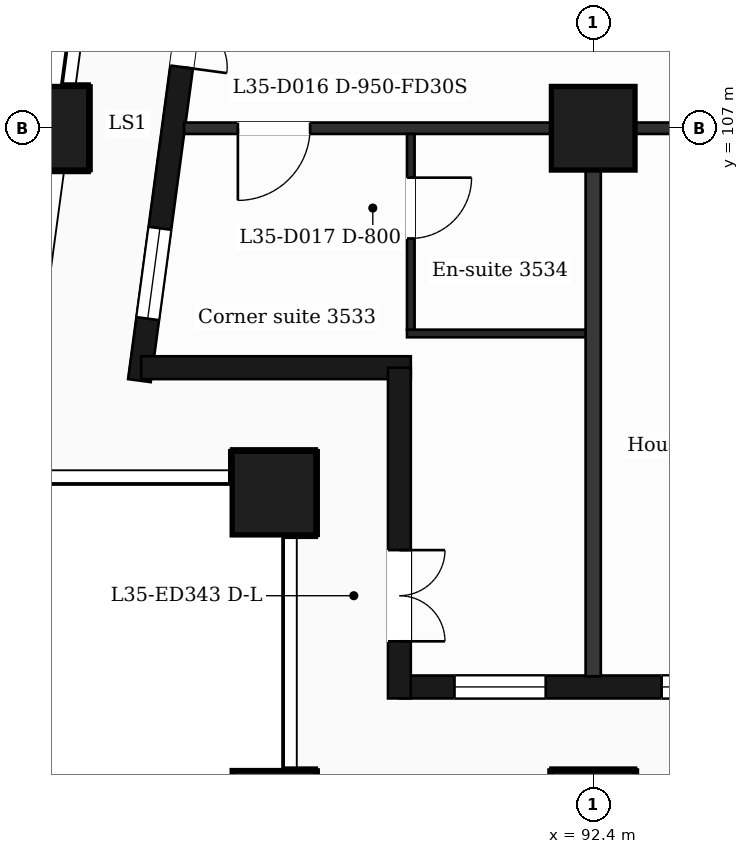
"""IFC4 building model, lengths in metres.
Left out: names, types, materials, properties, quantities, classifications, styles, units other than length and angle.
Written with IfcOpenShell. Run it as: python <this file> out.ifc"""

import sys

from ifc_helpers import new_model, si_unit, direction, frame, frame_2d, origin, origin_2d, place, context, subcontext, project, spatial, rectangle, extrude, element, fill, save


model = new_model("IFC4")
c1 = context("Model", 3, precision=1e-05, world=origin(), true_north=direction((0.0, 1.0)))
c2 = subcontext(c1, "Body", "Model", "MODEL_VIEW")
j1 = project(units=[si_unit("LENGTHUNIT", "METRE"), si_unit("PLANEANGLEUNIT", "RADIAN")], contexts=[c1])
p1 = place(None, origin())
s1 = spatial("IfcSite", under=j1, at=p1, CompositionType="ELEMENT")
p2 = place(p1, origin())
s2 = spatial("IfcBuilding", under=s1, at=p2, CompositionType="ELEMENT")
p3 = place(p2, frame((0.0, 0.0, 151.5)))
s3 = spatial("IfcBuildingStorey", under=s2, at=p3, CompositionType="ELEMENT", Elevation=151.5)
for number, where, z_axis, x_axis in (
    (1, (92.4, 98.0, 0.0), (0.0, 0.0, 1.0), (1.0, 0.0, 0.0)),
    (2, (88.2, 98.0, 0.0), (0.0, 0.0, 1.0), (1.0, 0.0, 0.0)),
    (3, (88.2, 102.2, 0.0), (0.0, 0.0, 1.0), (1.0, 0.0, 0.0)),
    (4, (92.4, 107.0, 0.0), (0.0, 0.0, 1.0), (1.0, 0.0, 0.0)),
    (5, (85.211, 107.0, 0.0), (0.0, 0.0, 1.0), (1.0, 0.0, 0.0)),
):
    element("IfcColumn", number, at=place(p3, frame(where, z_axis=z_axis, x_axis=x_axis)), inside=s3, PredefinedType="COLUMN", context=c2, shape_type="SweptSolid", body=[
        extrude(rectangle(XDim=1.1, YDim=1.1, at=origin_2d()), origin(), (0.0, 0.0, 1.0), 3.7),
    ])
p4 = place(p3, frame((89.85, 99.65, 0.0), z_axis=(0.0, 0.0, 1.0), x_axis=(1.0, 0.0, 0.0)))
e6 = element("IfcWall", 6, at=p4, inside=s3, PredefinedType="SOLIDWALL", context=c2, shape_type="SweptSolid", body=[
    extrude(rectangle(XDim=47.25, YDim=0.3, at=frame_2d((23.625, 0.0))), origin(), (0.0, 0.0, 1.0), 3.38),
])
p5 = place(p4, frame((0.725, 0.0, 0.9)))
e7 = element("IfcOpeningElement", 7, at=p5, cuts=e6, PredefinedType="OPENING", context=c2, shape_type="SweptSolid", body=[
    extrude(rectangle(XDim=1.2, YDim=2.1, at=frame_2d((0.6, 1.05))), frame((0.0, 0.16, 0.0), z_axis=(0.0, -1.0, 0.0), x_axis=(1.0, 0.0, 0.0)), (0.0, 0.0, 1.0), 0.32),
])
p6 = place(p4, frame((3.45, 0.0, 0.9)))
e8 = element("IfcOpeningElement", 8, at=p6, cuts=e6, PredefinedType="OPENING", context=c2, shape_type="SweptSolid", body=[
    extrude(rectangle(XDim=2.4, YDim=2.1, at=frame_2d((1.2, 1.05))), frame((0.0, 0.16, 0.0), z_axis=(0.0, -1.0, 0.0), x_axis=(1.0, 0.0, 0.0)), (0.0, 0.0, 1.0), 0.32),
])
p7 = place(p4, frame((7.35, 0.0, 0.0)))
e9 = element("IfcOpeningElement", 9, at=p7, cuts=e6, PredefinedType="OPENING", context=c2, shape_type="SweptSolid", body=[
    extrude(rectangle(XDim=1.2, YDim=2.4, at=frame_2d((0.6, 1.2))), frame((0.0, 0.16, 0.0), z_axis=(0.0, -1.0, 0.0), x_axis=(1.0, 0.0, 0.0)), (0.0, 0.0, 1.0), 0.32),
])
p8 = place(p4, frame((9.15, 0.0, 0.9)))
e10 = element("IfcOpeningElement", 10, at=p8, cuts=e6, PredefinedType="OPENING", context=c2, shape_type="SweptSolid", body=[
    extrude(rectangle(XDim=1.2, YDim=2.1, at=frame_2d((0.6, 1.05))), frame((0.0, 0.16, 0.0), z_axis=(0.0, -1.0, 0.0), x_axis=(1.0, 0.0, 0.0)), (0.0, 0.0, 1.0), 0.32),
])
p9 = place(p4, frame((11.85, 0.0, 0.9)))
e11 = element("IfcOpeningElement", 11, at=p9, cuts=e6, PredefinedType="OPENING", context=c2, shape_type="SweptSolid", body=[
    extrude(rectangle(XDim=2.4, YDim=2.1, at=frame_2d((1.2, 1.05))), frame((0.0, 0.16, 0.0), z_axis=(0.0, -1.0, 0.0), x_axis=(1.0, 0.0, 0.0)), (0.0, 0.0, 1.0), 0.32),
])
p10 = place(p4, frame((16.05, 0.0, 0.9)))
e12 = element("IfcOpeningElement", 12, at=p10, cuts=e6, PredefinedType="OPENING", context=c2, shape_type="SweptSolid", body=[
    extrude(rectangle(XDim=2.4, YDim=2.1, at=frame_2d((1.2, 1.05))), frame((0.0, 0.16, 0.0), z_axis=(0.0, -1.0, 0.0), x_axis=(1.0, 0.0, 0.0)), (0.0, 0.0, 1.0), 0.32),
])
p11 = place(p4, frame((20.85, 0.0, 0.9)))
e13 = element("IfcOpeningElement", 13, at=p11, cuts=e6, PredefinedType="OPENING", context=c2, shape_type="SweptSolid", body=[
    extrude(rectangle(XDim=1.2, YDim=2.1, at=frame_2d((0.6, 1.05))), frame((0.0, 0.16, 0.0), z_axis=(0.0, -1.0, 0.0), x_axis=(1.0, 0.0, 0.0)), (0.0, 0.0, 1.0), 0.32),
])
p12 = place(p4, frame((25.05, 0.0, 0.9)))
e14 = element("IfcOpeningElement", 14, at=p12, cuts=e6, PredefinedType="OPENING", context=c2, shape_type="SweptSolid", body=[
    extrude(rectangle(XDim=1.2, YDim=2.1, at=frame_2d((0.6, 1.05))), frame((0.0, 0.16, 0.0), z_axis=(0.0, -1.0, 0.0), x_axis=(1.0, 0.0, 0.0)), (0.0, 0.0, 1.0), 0.32),
])
p13 = place(p4, frame((28.65, 0.0, 0.9)))
e15 = element("IfcOpeningElement", 15, at=p13, cuts=e6, PredefinedType="OPENING", context=c2, shape_type="SweptSolid", body=[
    extrude(rectangle(XDim=2.4, YDim=2.1, at=frame_2d((1.2, 1.05))), frame((0.0, 0.16, 0.0), z_axis=(0.0, -1.0, 0.0), x_axis=(1.0, 0.0, 0.0)), (0.0, 0.0, 1.0), 0.32),
])
p14 = place(p4, frame((32.85, 0.0, 0.9)))
e16 = element("IfcOpeningElement", 16, at=p14, cuts=e6, PredefinedType="OPENING", context=c2, shape_type="SweptSolid", body=[
    extrude(rectangle(XDim=2.4, YDim=2.1, at=frame_2d((1.2, 1.05))), frame((0.0, 0.16, 0.0), z_axis=(0.0, -1.0, 0.0), x_axis=(1.0, 0.0, 0.0)), (0.0, 0.0, 1.0), 0.32),
])
p15 = place(p4, frame((37.05, 0.0, 0.9)))
e17 = element("IfcOpeningElement", 17, at=p15, cuts=e6, PredefinedType="OPENING", context=c2, shape_type="SweptSolid", body=[
    extrude(rectangle(XDim=2.4, YDim=2.1, at=frame_2d((1.2, 1.05))), frame((0.0, 0.16, 0.0), z_axis=(0.0, -1.0, 0.0), x_axis=(1.0, 0.0, 0.0)), (0.0, 0.0, 1.0), 0.32),
])
p16 = place(p4, frame((41.25, 0.0, 0.9)))
e18 = element("IfcOpeningElement", 18, at=p16, cuts=e6, PredefinedType="OPENING", context=c2, shape_type="SweptSolid", body=[
    extrude(rectangle(XDim=2.4, YDim=2.1, at=frame_2d((1.2, 1.05))), frame((0.0, 0.16, 0.0), z_axis=(0.0, -1.0, 0.0), x_axis=(1.0, 0.0, 0.0)), (0.0, 0.0, 1.0), 0.32),
])
p17 = place(p4, frame((45.25, 0.0, 0.9)))
e19 = element("IfcOpeningElement", 19, at=p17, cuts=e6, PredefinedType="OPENING", context=c2, shape_type="SweptSolid", body=[
    extrude(rectangle(XDim=1.2, YDim=2.1, at=frame_2d((0.6, 1.05))), frame((0.0, 0.16, 0.0), z_axis=(0.0, -1.0, 0.0), x_axis=(1.0, 0.0, 0.0)), (0.0, 0.0, 1.0), 0.32),
])
p18 = place(p3, frame((87.334, 110.4, 0.0), z_axis=(0.0, 0.0, 1.0), x_axis=(-0.133437175554, -0.991057273915, 0.0)))
e20 = element("IfcWall", 20, at=p18, inside=s3, PredefinedType="SOLIDWALL", context=c2, shape_type="SweptSolid", body=[
    extrude(rectangle(XDim=6.781, YDim=0.3, at=frame_2d((3.39, 0.0))), origin(), (0.0, 0.0, 1.0), 3.38),
])
p19 = place(p18, frame((1.418, 0.0, 0.0)))
e21 = element("IfcOpeningElement", 21, at=p19, cuts=e20, PredefinedType="OPENING", context=c2, shape_type="SweptSolid", body=[
    extrude(rectangle(XDim=1.2, YDim=2.4, at=frame_2d((0.6, 1.2))), frame((0.0, 0.16, 0.0), z_axis=(0.0, -1.0, 0.0), x_axis=(1.0, 0.0, 0.0)), (0.0, 0.0, 1.0), 0.32),
])
p20 = place(p18, frame((4.758, 0.0, 0.9)))
e22 = element("IfcOpeningElement", 22, at=p20, cuts=e20, PredefinedType="OPENING", context=c2, shape_type="SweptSolid", body=[
    extrude(rectangle(XDim=1.2, YDim=2.1, at=frame_2d((0.6, 1.05))), frame((0.0, 0.16, 0.0), z_axis=(0.0, -1.0, 0.0), x_axis=(1.0, 0.0, 0.0)), (0.0, 0.0, 1.0), 0.32),
])
p21 = place(p3, frame((86.452, 103.85, 0.0), z_axis=(0.0, 0.0, 1.0), x_axis=(1.0, 0.0, 0.0)))
e23 = element("IfcWall", 23, at=p21, inside=s3, PredefinedType="SOLIDWALL", context=c2, shape_type="SweptSolid", body=[
    extrude(rectangle(XDim=3.548, YDim=0.3, at=frame_2d((1.774, 0.0))), origin(), (0.0, 0.0, 1.0), 3.38),
])
p22 = place(p3, frame((89.85, 103.85, 0.0), z_axis=(0.0, 0.0, 1.0), x_axis=(0.0, -1.0, 0.0)))
e24 = element("IfcWall", 24, at=p22, inside=s3, PredefinedType="SOLIDWALL", context=c2, shape_type="SweptSolid", body=[
    extrude(rectangle(XDim=4.35, YDim=0.3, at=frame_2d((2.175, 0.0))), origin(), (0.0, 0.0, 1.0), 3.38),
])
p23 = place(p22, frame((2.4, 0.0, 0.0)))
e25 = element("IfcOpeningElement", 25, at=p23, cuts=e24, PredefinedType="OPENING", context=c2, shape_type="SweptSolid", body=[
    extrude(rectangle(XDim=1.2, YDim=2.4, at=frame_2d((0.6, 1.2))), frame((0.0, 0.16, 0.0), z_axis=(0.0, -1.0, 0.0), x_axis=(1.0, 0.0, 0.0)), (0.0, 0.0, 1.0), 0.32),
])
p24 = place(p3, frame((89.95, 104.3, 0.0), z_axis=(0.0, 0.0, 1.0), x_axis=(1.0, 0.0, 0.0)))
e26 = element("IfcWall", 26, at=p24, inside=s3, PredefinedType="PARTITIONING", context=c2, shape_type="SweptSolid", body=[
    extrude(rectangle(XDim=2.45, YDim=0.1, at=frame_2d((1.225, 0.0))), origin(), (0.0, 0.0, 1.0), 3.38),
])
p25 = place(p3, frame((87.018, 107.0, 0.0), z_axis=(0.0, 0.0, 1.0), x_axis=(1.0, 0.0, 0.0)))
e27 = element("IfcWall", 27, at=p25, inside=s3, PredefinedType="PARTITIONING", context=c2, shape_type="SweptSolid", body=[
    extrude(rectangle(XDim=52.765, YDim=0.15, at=frame_2d((26.382, 0.0))), origin(), (0.0, 0.0, 1.0), 3.38),
])
p26 = place(p25, frame((0.707, 0.0, 0.0)))
e28 = element("IfcOpeningElement", 28, at=p26, cuts=e27, PredefinedType="OPENING", context=c2, shape_type="SweptSolid", body=[
    extrude(rectangle(XDim=0.95, YDim=2.1, at=frame_2d((0.475, 1.05))), frame((0.0, 0.085, 0.0), z_axis=(0.0, -1.0, 0.0), x_axis=(1.0, 0.0, 0.0)), (0.0, 0.0, 1.0), 0.17),
])
p27 = place(p25, frame((7.645, 0.0, 0.0)))
e29 = element("IfcOpeningElement", 29, at=p27, cuts=e27, PredefinedType="OPENING", context=c2, shape_type="SweptSolid", body=[
    extrude(rectangle(XDim=0.95, YDim=2.1, at=frame_2d((0.475, 1.05))), frame((0.0, 0.085, 0.0), z_axis=(0.0, -1.0, 0.0), x_axis=(1.0, 0.0, 0.0)), (0.0, 0.0, 1.0), 0.17),
])
p28 = place(p25, frame((12.067, 0.0, 0.0)))
e30 = element("IfcOpeningElement", 30, at=p28, cuts=e27, PredefinedType="OPENING", context=c2, shape_type="SweptSolid", body=[
    extrude(rectangle(XDim=0.95, YDim=2.1, at=frame_2d((0.475, 1.05))), frame((0.0, 0.085, 0.0), z_axis=(0.0, -1.0, 0.0), x_axis=(1.0, 0.0, 0.0)), (0.0, 0.0, 1.0), 0.17),
])
p29 = place(p25, frame((14.582, 0.0, 0.0)))
e31 = element("IfcOpeningElement", 31, at=p29, cuts=e27, PredefinedType="OPENING", context=c2, shape_type="SweptSolid", body=[
    extrude(rectangle(XDim=0.95, YDim=2.1, at=frame_2d((0.475, 1.05))), frame((0.0, 0.085, 0.0), z_axis=(0.0, -1.0, 0.0), x_axis=(1.0, 0.0, 0.0)), (0.0, 0.0, 1.0), 0.17),
])
p30 = place(p25, frame((20.432, 0.0, 0.0)))
e32 = element("IfcOpeningElement", 32, at=p30, cuts=e27, PredefinedType="OPENING", context=c2, shape_type="SweptSolid", body=[
    extrude(rectangle(XDim=0.95, YDim=2.1, at=frame_2d((0.475, 1.05))), frame((0.0, 0.085, 0.0), z_axis=(0.0, -1.0, 0.0), x_axis=(1.0, 0.0, 0.0)), (0.0, 0.0, 1.0), 0.17),
])
p31 = place(p25, frame((23.532, 0.0, 0.0)))
e33 = element("IfcOpeningElement", 33, at=p31, cuts=e27, PredefinedType="OPENING", context=c2, shape_type="SweptSolid", body=[
    extrude(rectangle(XDim=1.0, YDim=2.1, at=frame_2d((0.5, 1.05))), frame((0.0, 0.085, 0.0), z_axis=(0.0, -1.0, 0.0), x_axis=(1.0, 0.0, 0.0)), (0.0, 0.0, 1.0), 0.17),
])
p32 = place(p25, frame((36.807, 0.0, 0.0)))
e34 = element("IfcOpeningElement", 34, at=p32, cuts=e27, PredefinedType="OPENING", context=c2, shape_type="SweptSolid", body=[
    extrude(rectangle(XDim=1.0, YDim=2.1, at=frame_2d((0.5, 1.05))), frame((0.0, 0.085, 0.0), z_axis=(0.0, -1.0, 0.0), x_axis=(1.0, 0.0, 0.0)), (0.0, 0.0, 1.0), 0.17),
])
p33 = place(p25, frame((43.457, 0.0, 0.0)))
e35 = element("IfcOpeningElement", 35, at=p33, cuts=e27, PredefinedType="OPENING", context=c2, shape_type="SweptSolid", body=[
    extrude(rectangle(XDim=0.95, YDim=2.1, at=frame_2d((0.475, 1.05))), frame((0.0, 0.085, 0.0), z_axis=(0.0, -1.0, 0.0), x_axis=(1.0, 0.0, 0.0)), (0.0, 0.0, 1.0), 0.17),
])
p34 = place(p25, frame((48.974, 0.0, 0.0)))
e36 = element("IfcOpeningElement", 36, at=p34, cuts=e27, PredefinedType="OPENING", context=c2, shape_type="SweptSolid", body=[
    extrude(rectangle(XDim=0.95, YDim=2.1, at=frame_2d((0.475, 1.05))), frame((0.0, 0.085, 0.0), z_axis=(0.0, -1.0, 0.0), x_axis=(1.0, 0.0, 0.0)), (0.0, 0.0, 1.0), 0.17),
])
p35 = place(p3, frame((90.0, 104.35, 0.0), z_axis=(0.0, 0.0, 1.0), x_axis=(0.0, 1.0, 0.0)))
e37 = element("IfcWall", 37, at=p35, inside=s3, PredefinedType="PARTITIONING", context=c2, shape_type="SweptSolid", body=[
    extrude(rectangle(XDim=2.575, YDim=0.1, at=frame_2d((1.288, 0.0))), origin(), (0.0, 0.0, 1.0), 3.38),
])
p36 = place(p35, frame((1.2, 0.0, 0.0)))
e38 = element("IfcOpeningElement", 38, at=p36, cuts=e37, PredefinedType="OPENING", context=c2, shape_type="SweptSolid", body=[
    extrude(rectangle(XDim=0.8, YDim=2.1, at=frame_2d((0.4, 1.05))), frame((0.0, 0.06, 0.0), z_axis=(0.0, -1.0, 0.0), x_axis=(1.0, 0.0, 0.0)), (0.0, 0.0, 1.0), 0.12),
])
p37 = place(p3, frame((92.4, 99.79, 0.0), z_axis=(0.0, 0.0, 1.0), x_axis=(0.0, 1.0, 0.0)))
e39 = element("IfcWall", 39, at=p37, inside=s3, PredefinedType="PARTITIONING", context=c2, shape_type="SweptSolid", body=[
    extrude(rectangle(XDim=7.135, YDim=0.2, at=frame_2d((3.567, 0.0))), origin(), (0.0, 0.0, 1.0), 3.38),
])
p38 = place(p5, origin())
e40 = element("IfcWindow", 40, at=p38, inside=s3, PartitioningType="SINGLE_PANEL", PredefinedType="WINDOW", context=c2, shape_type="SweptSolid", body=[
    extrude(rectangle(XDim=1.2, YDim=2.1, at=frame_2d((0.6, 1.05))), frame((0.0, 0.03, 0.0), z_axis=(0.0, -1.0, 0.0), x_axis=(1.0, 0.0, 0.0)), (0.0, 0.0, 1.0), 0.06),
])
fill(e7, e40)
p39 = place(p6, origin())
e41 = element("IfcWindow", 41, at=p39, inside=s3, PartitioningType="SINGLE_PANEL", PredefinedType="WINDOW", context=c2, shape_type="SweptSolid", body=[
    extrude(rectangle(XDim=2.4, YDim=2.1, at=frame_2d((1.2, 1.05))), frame((0.0, 0.03, 0.0), z_axis=(0.0, -1.0, 0.0), x_axis=(1.0, 0.0, 0.0)), (0.0, 0.0, 1.0), 0.06),
])
fill(e8, e41)
p40 = place(p19, origin())
e42 = element("IfcDoor", 42, at=p40, inside=s3, OperationType="DOUBLE_DOOR_SINGLE_SWING", PredefinedType="DOOR", context=c2, shape_type="SweptSolid", body=[
    extrude(rectangle(XDim=1.2, YDim=2.4, at=frame_2d((0.6, 1.2))), frame((0.0, 0.025, 0.0), z_axis=(0.0, -1.0, 0.0), x_axis=(1.0, 0.0, 0.0)), (0.0, 0.0, 1.0), 0.05),
])
fill(e21, e42)
p41 = place(p20, origin())
e43 = element("IfcWindow", 43, at=p41, inside=s3, PartitioningType="SINGLE_PANEL", PredefinedType="WINDOW", context=c2, shape_type="SweptSolid", body=[
    extrude(rectangle(XDim=1.2, YDim=2.1, at=frame_2d((0.6, 1.05))), frame((0.0, 0.03, 0.0), z_axis=(0.0, -1.0, 0.0), x_axis=(1.0, 0.0, 0.0)), (0.0, 0.0, 1.0), 0.06),
])
fill(e22, e43)
p42 = place(p23, origin())
e44 = element("IfcDoor", 44, at=p42, inside=s3, OperationType="DOUBLE_DOOR_SINGLE_SWING", PredefinedType="DOOR", context=c2, shape_type="SweptSolid", body=[
    extrude(rectangle(XDim=1.2, YDim=2.4, at=frame_2d((0.6, 1.2))), frame((0.0, 0.025, 0.0), z_axis=(0.0, -1.0, 0.0), x_axis=(1.0, 0.0, 0.0)), (0.0, 0.0, 1.0), 0.05),
])
fill(e25, e44)
p43 = place(p26, origin())
e45 = element("IfcDoor", 45, at=p43, inside=s3, OperationType="SINGLE_SWING_LEFT", PredefinedType="DOOR", context=c2, shape_type="SweptSolid", body=[
    extrude(rectangle(XDim=0.95, YDim=2.1, at=frame_2d((0.475, 1.05))), frame((0.0, 0.025, 0.0), z_axis=(0.0, -1.0, 0.0), x_axis=(1.0, 0.0, 0.0)), (0.0, 0.0, 1.0), 0.05),
])
fill(e28, e45)
p44 = place(p36, origin())
e46 = element("IfcDoor", 46, at=p44, inside=s3, OperationType="SINGLE_SWING_RIGHT", PredefinedType="DOOR", context=c2, shape_type="SweptSolid", body=[
    extrude(rectangle(XDim=0.8, YDim=2.1, at=frame_2d((0.4, 1.05))), frame((0.0, 0.025, 0.0), z_axis=(0.0, -1.0, 0.0), x_axis=(1.0, 0.0, 0.0)), (0.0, 0.0, 1.0), 0.05),
])
fill(e38, e46)
save(model, sys.argv[1])
